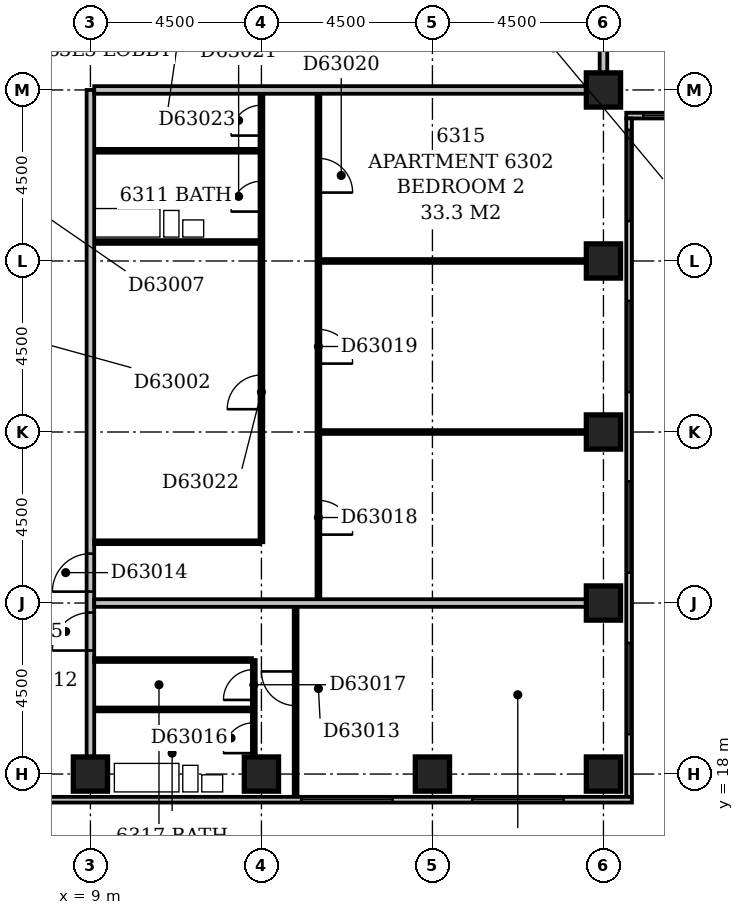
"""IFC4 building model, lengths in metres.
Left out: names, types, materials, properties, quantities, classifications, styles, units other than length and angle.
Written with IfcOpenShell. Run it as: python <this file> out.ifc"""

import sys

from ifc_helpers import new_model, si_unit, direction, frame, frame_2d, origin, origin_2d, place, context, subcontext, project, spatial, rectangle, extrude, element, fill, save


model = new_model("IFC4")
c1 = context("Model", 3, precision=1e-05, world=origin(), true_north=direction((0.0, 1.0)))
c2 = subcontext(c1, "Body", "Model", "MODEL_VIEW")
j1 = project(units=[si_unit("LENGTHUNIT", "METRE"), si_unit("PLANEANGLEUNIT", "RADIAN")], contexts=[c1])
p1 = place(None, origin())
s1 = spatial("IfcSite", under=j1, at=p1, CompositionType="ELEMENT")
p2 = place(p1, origin())
s2 = spatial("IfcBuilding", under=s1, at=p2, CompositionType="ELEMENT")
p3 = place(p2, frame((0.0, 0.0, 243.8)))
s3 = spatial("IfcBuildingStorey", under=s2, at=p3, CompositionType="ELEMENT", Elevation=243.8)
for number, where, z_axis, x_axis in (
    (1, (9.0, 18.0, -0.3), (0.0, 0.0, 1.0), (1.0, 0.0, 0.0)),
    (2, (13.5, 18.0, -0.3), (0.0, 0.0, 1.0), (1.0, 0.0, 0.0)),
    (3, (18.0, 18.0, -0.3), (0.0, 0.0, 1.0), (1.0, 0.0, 0.0)),
    (4, (22.5, 18.0, -0.3), (0.0, 0.0, 1.0), (1.0, 0.0, 0.0)),
    (5, (22.5, 22.5, -0.3), (0.0, 0.0, 1.0), (1.0, 0.0, 0.0)),
    (6, (22.5, 27.0, -0.3), (0.0, 0.0, 1.0), (1.0, 0.0, 0.0)),
    (7, (22.5, 31.5, -0.3), (0.0, 0.0, 1.0), (1.0, 0.0, 0.0)),
    (8, (22.5, 36.0, -0.3), (0.0, 0.0, 1.0), (1.0, 0.0, 0.0)),
):
    element("IfcColumn", number, at=place(p3, frame(where, z_axis=z_axis, x_axis=x_axis)), inside=s3, PredefinedType="COLUMN", context=c2, shape_type="SweptSolid", body=[
        extrude(rectangle(XDim=0.9, YDim=0.9, at=origin_2d()), origin(), (0.0, 0.0, 1.0), 3.6),
    ])
p4 = place(p3, frame((3.9, 17.325, 0.0), z_axis=(0.0, 0.0, 1.0), x_axis=(1.0, 0.0, 0.0)))
e9 = element("IfcWall", 9, at=p4, inside=s3, PredefinedType="STANDARD", context=c2, shape_type="SweptSolid", body=[
    extrude(rectangle(XDim=19.35, YDim=0.15, at=frame_2d((9.675, 0.0))), origin(), (0.0, 0.0, 1.0), 2.7),
])
p5 = place(p4, frame((10.65, 0.0, 0.6)))
e10 = element("IfcOpeningElement", 10, at=p5, cuts=e9, PredefinedType="OPENING", context=c2, shape_type="SweptSolid", body=[
    extrude(rectangle(XDim=2.4, YDim=1.8, at=frame_2d((1.2, 0.9))), frame((0.0, 0.087, 0.0), z_axis=(0.0, -1.0, 0.0), x_axis=(1.0, 0.0, 0.0)), (0.0, 0.0, 1.0), 0.174),
])
p6 = place(p4, frame((15.15, 0.0, 0.6)))
e11 = element("IfcOpeningElement", 11, at=p6, cuts=e9, PredefinedType="OPENING", context=c2, shape_type="SweptSolid", body=[
    extrude(rectangle(XDim=2.4, YDim=1.8, at=frame_2d((1.2, 0.9))), frame((0.0, 0.087, 0.0), z_axis=(0.0, -1.0, 0.0), x_axis=(1.0, 0.0, 0.0)), (0.0, 0.0, 1.0), 0.174),
])
p7 = place(p3, frame((23.175, 17.4, 0.0), z_axis=(0.0, 0.0, 1.0), x_axis=(0.0, 1.0, 0.0)))
e12 = element("IfcWall", 12, at=p7, inside=s3, PredefinedType="STANDARD", context=c2, shape_type="SweptSolid", body=[
    extrude(rectangle(XDim=17.85, YDim=0.15, at=frame_2d((8.925, 0.0))), origin(), (0.0, 0.0, 1.0), 2.7),
])
p8 = place(p7, frame((1.65, 0.0, 0.6)))
e13 = element("IfcOpeningElement", 13, at=p8, cuts=e12, PredefinedType="OPENING", context=c2, shape_type="SweptSolid", body=[
    extrude(rectangle(XDim=2.4, YDim=1.8, at=frame_2d((1.2, 0.9))), frame((0.0, 0.087, 0.0), z_axis=(0.0, -1.0, 0.0), x_axis=(1.0, 0.0, 0.0)), (0.0, 0.0, 1.0), 0.174),
])
p9 = place(p7, frame((5.901, 0.0, 0.6)))
e14 = element("IfcOpeningElement", 14, at=p9, cuts=e12, PredefinedType="OPENING", context=c2, shape_type="SweptSolid", body=[
    extrude(rectangle(XDim=2.4, YDim=1.8, at=frame_2d((1.2, 0.9))), frame((0.0, 0.087, 0.0), z_axis=(0.0, -1.0, 0.0), x_axis=(1.0, 0.0, 0.0)), (0.0, 0.0, 1.0), 0.174),
])
p10 = place(p7, frame((10.65, 0.0, 0.6)))
e15 = element("IfcOpeningElement", 15, at=p10, cuts=e12, PredefinedType="OPENING", context=c2, shape_type="SweptSolid", body=[
    extrude(rectangle(XDim=2.4, YDim=1.8, at=frame_2d((1.2, 0.9))), frame((0.0, 0.087, 0.0), z_axis=(0.0, -1.0, 0.0), x_axis=(1.0, 0.0, 0.0)), (0.0, 0.0, 1.0), 0.174),
])
p11 = place(p7, frame((15.15, 0.0, 0.6)))
e16 = element("IfcOpeningElement", 16, at=p11, cuts=e12, PredefinedType="OPENING", context=c2, shape_type="SweptSolid", body=[
    extrude(rectangle(XDim=2.4, YDim=1.8, at=frame_2d((1.2, 0.9))), frame((0.0, 0.087, 0.0), z_axis=(0.0, -1.0, 0.0), x_axis=(1.0, 0.0, 0.0)), (0.0, 0.0, 1.0), 0.174),
])
p12 = place(p3, frame((23.1, 35.325, 0.0), z_axis=(0.0, 0.0, 1.0), x_axis=(1.0, 0.0, 0.0)))
e17 = element("IfcWall", 17, at=p12, inside=s3, PredefinedType="STANDARD", context=c2, shape_type="SweptSolid", body=[
    extrude(rectangle(XDim=3.9, YDim=0.15, at=frame_2d((1.95, 0.0))), origin(), (0.0, 0.0, 1.0), 2.7),
])
p13 = place(p12, frame((0.45, 0.0, 0.6)))
e18 = element("IfcOpeningElement", 18, at=p13, cuts=e17, PredefinedType="OPENING", context=c2, shape_type="SweptSolid", body=[
    extrude(rectangle(XDim=2.4, YDim=1.8, at=frame_2d((1.2, 0.9))), frame((0.0, 0.087, 0.0), z_axis=(0.0, -1.0, 0.0), x_axis=(1.0, 0.0, 0.0)), (0.0, 0.0, 1.0), 0.174),
])
p14 = place(p3, frame((14.4, 17.4, 0.0), z_axis=(0.0, 0.0, 1.0), x_axis=(0.0, 1.0, 0.0)))
e19 = element("IfcWall", 19, at=p14, inside=s3, PredefinedType="PARTITIONING", context=c2, shape_type="SweptSolid", body=[
    extrude(rectangle(XDim=5.0, YDim=0.1, at=frame_2d((2.5, 0.0))), origin(), (0.0, 0.0, 1.0), 3.3),
])
p15 = place(p14, frame((2.4, 0.0, 0.0)))
e20 = element("IfcOpeningElement", 20, at=p15, cuts=e19, PredefinedType="OPENING", context=c2, shape_type="SweptSolid", body=[
    extrude(rectangle(XDim=0.9, YDim=2.1, at=frame_2d((0.45, 1.05))), frame((0.0, 0.062, 0.0), z_axis=(0.0, -1.0, 0.0), x_axis=(1.0, 0.0, 0.0)), (0.0, 0.0, 1.0), 0.124),
])
p16 = place(p3, frame((9.0, 18.45, 0.0), z_axis=(0.0, 0.0, 1.0), x_axis=(0.0, 1.0, 0.0)))
e21 = element("IfcWall", 21, at=p16, inside=s3, PredefinedType="PARTITIONING", context=c2, shape_type="SweptSolid", body=[
    extrude(rectangle(XDim=17.55, YDim=0.2, at=frame_2d((8.775, 0.0))), origin(), (0.0, 0.0, 1.0), 3.3),
])
p17 = place(p16, frame((4.35, 0.0, 0.0)))
e22 = element("IfcOpeningElement", 22, at=p17, cuts=e21, PredefinedType="OPENING", context=c2, shape_type="SweptSolid", body=[
    extrude(rectangle(XDim=1.0, YDim=2.1, at=frame_2d((0.5, 1.05))), frame((0.0, 0.112, 0.0), z_axis=(0.0, -1.0, 0.0), x_axis=(1.0, 0.0, 0.0)), (0.0, 0.0, 1.0), 0.224),
])
p18 = place(p16, frame((2.8, 0.0, 0.0)))
e23 = element("IfcOpeningElement", 23, at=p18, cuts=e21, PredefinedType="OPENING", context=c2, shape_type="SweptSolid", body=[
    extrude(rectangle(XDim=1.0, YDim=2.1, at=frame_2d((0.5, 1.05))), frame((0.0, 0.112, 0.0), z_axis=(0.0, -1.0, 0.0), x_axis=(1.0, 0.0, 0.0)), (0.0, 0.0, 1.0), 0.224),
])
p19 = place(p3, frame((13.3, 18.45, 0.0), z_axis=(0.0, 0.0, 1.0), x_axis=(0.0, 1.0, 0.0)))
e24 = element("IfcWall", 24, at=p19, inside=s3, PredefinedType="PARTITIONING", context=c2, shape_type="SweptSolid", body=[
    extrude(rectangle(XDim=2.55, YDim=0.1, at=frame_2d((1.275, 0.0))), origin(), (0.0, 0.0, 1.0), 3.3),
])
p20 = place(p19, frame((0.1, 0.0, 0.0)))
e25 = element("IfcOpeningElement", 25, at=p20, cuts=e24, PredefinedType="OPENING", context=c2, shape_type="SweptSolid", body=[
    extrude(rectangle(XDim=0.8, YDim=2.1, at=frame_2d((0.4, 1.05))), frame((0.0, 0.062, 0.0), z_axis=(0.0, -1.0, 0.0), x_axis=(1.0, 0.0, 0.0)), (0.0, 0.0, 1.0), 0.124),
])
p21 = place(p19, frame((1.5, 0.0, 0.0)))
e26 = element("IfcOpeningElement", 26, at=p21, cuts=e24, PredefinedType="OPENING", context=c2, shape_type="SweptSolid", body=[
    extrude(rectangle(XDim=0.8, YDim=2.1, at=frame_2d((0.4, 1.05))), frame((0.0, 0.062, 0.0), z_axis=(0.0, -1.0, 0.0), x_axis=(1.0, 0.0, 0.0)), (0.0, 0.0, 1.0), 0.124),
])
p22 = place(p3, frame((9.1, 19.7, 0.0), z_axis=(0.0, 0.0, 1.0), x_axis=(1.0, 0.0, 0.0)))
e27 = element("IfcWall", 27, at=p22, inside=s3, PredefinedType="PLUMBINGWALL", context=c2, shape_type="SweptSolid", body=[
    extrude(rectangle(XDim=4.15, YDim=0.1, at=frame_2d((2.075, 0.0))), origin(), (0.0, 0.0, 1.0), 3.3),
])
p23 = place(p3, frame((9.1, 21.0, 0.0), z_axis=(0.0, 0.0, 1.0), x_axis=(1.0, 0.0, 0.0)))
e28 = element("IfcWall", 28, at=p23, inside=s3, PredefinedType="PARTITIONING", context=c2, shape_type="SweptSolid", body=[
    extrude(rectangle(XDim=4.15, YDim=0.1, at=frame_2d((2.075, 0.0))), origin(), (0.0, 0.0, 1.0), 3.3),
])
p24 = place(p3, frame((9.1, 22.5, 0.0), z_axis=(0.0, 0.0, 1.0), x_axis=(1.0, 0.0, 0.0)))
e29 = element("IfcWall", 29, at=p24, inside=s3, PredefinedType="PARTITIONING", context=c2, shape_type="SweptSolid", body=[
    extrude(rectangle(XDim=12.95, YDim=0.2, at=frame_2d((6.475, 0.0))), origin(), (0.0, 0.0, 1.0), 3.3),
])
p25 = place(p3, frame((15.0, 22.6, 0.0), z_axis=(0.0, 0.0, 1.0), x_axis=(0.0, 1.0, 0.0)))
e30 = element("IfcWall", 30, at=p25, inside=s3, PredefinedType="PARTITIONING", context=c2, shape_type="SweptSolid", body=[
    extrude(rectangle(XDim=13.3, YDim=0.1, at=frame_2d((6.65, 0.0))), origin(), (0.0, 0.0, 1.0), 3.3),
])
p26 = place(p25, frame((1.7, 0.0, 0.0)))
e31 = element("IfcOpeningElement", 31, at=p26, cuts=e30, PredefinedType="OPENING", context=c2, shape_type="SweptSolid", body=[
    extrude(rectangle(XDim=0.9, YDim=2.1, at=frame_2d((0.45, 1.05))), frame((0.0, 0.062, 0.0), z_axis=(0.0, -1.0, 0.0), x_axis=(1.0, 0.0, 0.0)), (0.0, 0.0, 1.0), 0.124),
])
p27 = place(p25, frame((6.2, 0.0, 0.0)))
e32 = element("IfcOpeningElement", 32, at=p27, cuts=e30, PredefinedType="OPENING", context=c2, shape_type="SweptSolid", body=[
    extrude(rectangle(XDim=0.9, YDim=2.1, at=frame_2d((0.45, 1.05))), frame((0.0, 0.062, 0.0), z_axis=(0.0, -1.0, 0.0), x_axis=(1.0, 0.0, 0.0)), (0.0, 0.0, 1.0), 0.124),
])
p28 = place(p25, frame((10.7, 0.0, 0.0)))
e33 = element("IfcOpeningElement", 33, at=p28, cuts=e30, PredefinedType="OPENING", context=c2, shape_type="SweptSolid", body=[
    extrude(rectangle(XDim=0.9, YDim=2.1, at=frame_2d((0.45, 1.05))), frame((0.0, 0.062, 0.0), z_axis=(0.0, -1.0, 0.0), x_axis=(1.0, 0.0, 0.0)), (0.0, 0.0, 1.0), 0.124),
])
p29 = place(p3, frame((9.1, 24.1, 0.0), z_axis=(0.0, 0.0, 1.0), x_axis=(1.0, 0.0, 0.0)))
e34 = element("IfcWall", 34, at=p29, inside=s3, PredefinedType="PARTITIONING", context=c2, shape_type="SweptSolid", body=[
    extrude(rectangle(XDim=4.35, YDim=0.1, at=frame_2d((2.175, 0.0))), origin(), (0.0, 0.0, 1.0), 3.3),
])
p30 = place(p3, frame((13.5, 24.1, 0.0), z_axis=(0.0, 0.0, 1.0), x_axis=(0.0, 1.0, 0.0)))
e35 = element("IfcWall", 35, at=p30, inside=s3, PredefinedType="PARTITIONING", context=c2, shape_type="SweptSolid", body=[
    extrude(rectangle(XDim=11.8, YDim=0.1, at=frame_2d((5.9, 0.0))), origin(), (0.0, 0.0, 1.0), 3.3),
])
p31 = place(p30, frame((8.7, 0.0, 0.0)))
e36 = element("IfcOpeningElement", 36, at=p31, cuts=e35, PredefinedType="OPENING", context=c2, shape_type="SweptSolid", body=[
    extrude(rectangle(XDim=0.8, YDim=2.1, at=frame_2d((0.4, 1.05))), frame((0.0, 0.062, 0.0), z_axis=(0.0, -1.0, 0.0), x_axis=(1.0, 0.0, 0.0)), (0.0, 0.0, 1.0), 0.124),
])
p32 = place(p30, frame((3.5, 0.0, 0.0)))
e37 = element("IfcOpeningElement", 37, at=p32, cuts=e35, PredefinedType="OPENING", context=c2, shape_type="SweptSolid", body=[
    extrude(rectangle(XDim=0.9, YDim=2.1, at=frame_2d((0.45, 1.05))), frame((0.0, 0.062, 0.0), z_axis=(0.0, -1.0, 0.0), x_axis=(1.0, 0.0, 0.0)), (0.0, 0.0, 1.0), 0.124),
])
p33 = place(p30, frame((10.7, 0.0, 0.0)))
e38 = element("IfcOpeningElement", 38, at=p33, cuts=e35, PredefinedType="OPENING", context=c2, shape_type="SweptSolid", body=[
    extrude(rectangle(XDim=0.8, YDim=2.1, at=frame_2d((0.4, 1.05))), frame((0.0, 0.062, 0.0), z_axis=(0.0, -1.0, 0.0), x_axis=(1.0, 0.0, 0.0)), (0.0, 0.0, 1.0), 0.124),
])
p34 = place(p3, frame((15.05, 27.0, 0.0), z_axis=(0.0, 0.0, 1.0), x_axis=(1.0, 0.0, 0.0)))
e39 = element("IfcWall", 39, at=p34, inside=s3, PredefinedType="PARTITIONING", context=c2, shape_type="SweptSolid", body=[
    extrude(rectangle(XDim=7.0, YDim=0.1, at=frame_2d((3.5, 0.0))), origin(), (0.0, 0.0, 1.0), 2.7),
])
p35 = place(p3, frame((15.05, 31.5, 0.0), z_axis=(0.0, 0.0, 1.0), x_axis=(1.0, 0.0, 0.0)))
e40 = element("IfcWall", 40, at=p35, inside=s3, PredefinedType="PARTITIONING", context=c2, shape_type="SweptSolid", body=[
    extrude(rectangle(XDim=7.0, YDim=0.1, at=frame_2d((3.5, 0.0))), origin(), (0.0, 0.0, 1.0), 3.3),
])
for number, where, z_axis, x_axis in (
    (41, (9.1, 32.0, 0.0), (0.0, 0.0, 1.0), (1.0, 0.0, 0.0)),
    (42, (9.1, 34.4, 0.0), (0.0, 0.0, 1.0), (1.0, 0.0, 0.0)),
):
    element("IfcWall", number, at=place(p3, frame(where, z_axis=z_axis, x_axis=x_axis)), inside=s3, PredefinedType="PLUMBINGWALL", context=c2, shape_type="SweptSolid", body=[
        extrude(rectangle(XDim=4.35, YDim=0.1, at=frame_2d((2.175, 0.0))), origin(), (0.0, 0.0, 1.0), 3.3),
    ])
p36 = place(p3, frame((9.1, 36.0, 0.0), z_axis=(0.0, 0.0, 1.0), x_axis=(1.0, 0.0, 0.0)))
e43 = element("IfcWall", 43, at=p36, inside=s3, PredefinedType="PARTITIONING", context=c2, shape_type="SweptSolid", body=[
    extrude(rectangle(XDim=12.95, YDim=0.2, at=frame_2d((6.475, 0.0))), origin(), (0.0, 0.0, 1.0), 3.3),
])
p37 = place(p3, frame((22.5, 36.45, 0.0), z_axis=(0.0, 0.0, 1.0), x_axis=(0.0, 1.0, 0.0)))
e44 = element("IfcWall", 44, at=p37, inside=s3, PredefinedType="PARTITIONING", context=c2, shape_type="SweptSolid", body=[
    extrude(rectangle(XDim=13.05, YDim=0.2, at=frame_2d((6.525, 0.0))), origin(), (0.0, 0.0, 1.0), 3.3),
])
p38 = place(p5, origin())
e45 = element("IfcWindow", 45, at=p38, inside=s3, PartitioningType="SINGLE_PANEL", PredefinedType="WINDOW", context=c2, shape_type="SweptSolid", body=[
    extrude(rectangle(XDim=2.4, YDim=1.8, at=frame_2d((1.2, 0.9))), frame((0.0, 0.03, 0.0), z_axis=(0.0, -1.0, 0.0), x_axis=(1.0, 0.0, 0.0)), (0.0, 0.0, 1.0), 0.06),
])
fill(e10, e45)
p39 = place(p6, origin())
e46 = element("IfcWindow", 46, at=p39, inside=s3, PartitioningType="SINGLE_PANEL", PredefinedType="WINDOW", context=c2, shape_type="SweptSolid", body=[
    extrude(rectangle(XDim=2.4, YDim=1.8, at=frame_2d((1.2, 0.9))), frame((0.0, 0.03, 0.0), z_axis=(0.0, -1.0, 0.0), x_axis=(1.0, 0.0, 0.0)), (0.0, 0.0, 1.0), 0.06),
])
fill(e11, e46)
p40 = place(p8, origin())
e47 = element("IfcWindow", 47, at=p40, inside=s3, PartitioningType="SINGLE_PANEL", PredefinedType="WINDOW", context=c2, shape_type="SweptSolid", body=[
    extrude(rectangle(XDim=2.4, YDim=1.8, at=frame_2d((1.2, 0.9))), frame((0.0, 0.03, 0.0), z_axis=(0.0, -1.0, 0.0), x_axis=(1.0, 0.0, 0.0)), (0.0, 0.0, 1.0), 0.06),
])
fill(e13, e47)
p41 = place(p9, origin())
e48 = element("IfcWindow", 48, at=p41, inside=s3, PartitioningType="SINGLE_PANEL", PredefinedType="WINDOW", context=c2, shape_type="SweptSolid", body=[
    extrude(rectangle(XDim=2.4, YDim=1.8, at=frame_2d((1.2, 0.9))), frame((0.0, 0.03, 0.0), z_axis=(0.0, -1.0, 0.0), x_axis=(1.0, 0.0, 0.0)), (0.0, 0.0, 1.0), 0.06),
])
fill(e14, e48)
p42 = place(p10, origin())
e49 = element("IfcWindow", 49, at=p42, inside=s3, PartitioningType="SINGLE_PANEL", PredefinedType="WINDOW", context=c2, shape_type="SweptSolid", body=[
    extrude(rectangle(XDim=2.4, YDim=1.8, at=frame_2d((1.2, 0.9))), frame((0.0, 0.03, 0.0), z_axis=(0.0, -1.0, 0.0), x_axis=(1.0, 0.0, 0.0)), (0.0, 0.0, 1.0), 0.06),
])
fill(e15, e49)
p43 = place(p11, origin())
e50 = element("IfcWindow", 50, at=p43, inside=s3, PartitioningType="SINGLE_PANEL", PredefinedType="WINDOW", context=c2, shape_type="SweptSolid", body=[
    extrude(rectangle(XDim=2.4, YDim=1.8, at=frame_2d((1.2, 0.9))), frame((0.0, 0.03, 0.0), z_axis=(0.0, -1.0, 0.0), x_axis=(1.0, 0.0, 0.0)), (0.0, 0.0, 1.0), 0.06),
])
fill(e16, e50)
p44 = place(p13, origin())
e51 = element("IfcWindow", 51, at=p44, inside=s3, PartitioningType="SINGLE_PANEL", PredefinedType="WINDOW", context=c2, shape_type="SweptSolid", body=[
    extrude(rectangle(XDim=2.4, YDim=1.8, at=frame_2d((1.2, 0.9))), frame((0.0, 0.03, 0.0), z_axis=(0.0, -1.0, 0.0), x_axis=(1.0, 0.0, 0.0)), (0.0, 0.0, 1.0), 0.06),
])
fill(e18, e51)
p45 = place(p15, frame((0.9, 0.0, 0.0), z_axis=(0.0, 0.0, 1.0), x_axis=(-1.0, 0.0, 0.0)))
e52 = element("IfcDoor", 52, at=p45, inside=s3, OperationType="SINGLE_SWING_LEFT", PredefinedType="DOOR", context=c2, shape_type="SweptSolid", body=[
    extrude(rectangle(XDim=0.9, YDim=2.1, at=frame_2d((0.45, 1.05))), frame((0.0, 0.025, 0.0), z_axis=(0.0, -1.0, 0.0), x_axis=(1.0, 0.0, 0.0)), (0.0, 0.0, 1.0), 0.05),
])
fill(e20, e52)
p46 = place(p17, origin())
e53 = element("IfcDoor", 53, at=p46, inside=s3, OperationType="SINGLE_SWING_LEFT", PredefinedType="DOOR", context=c2, shape_type="SweptSolid", body=[
    extrude(rectangle(XDim=1.0, YDim=2.1, at=frame_2d((0.5, 1.05))), frame((0.0, 0.025, 0.0), z_axis=(0.0, -1.0, 0.0), x_axis=(1.0, 0.0, 0.0)), (0.0, 0.0, 1.0), 0.05),
])
fill(e22, e53)
p47 = place(p18, origin())
e54 = element("IfcDoor", 54, at=p47, inside=s3, OperationType="SINGLE_SWING_LEFT", PredefinedType="DOOR", context=c2, shape_type="SweptSolid", body=[
    extrude(rectangle(XDim=1.0, YDim=2.1, at=frame_2d((0.5, 1.05))), frame((0.0, 0.025, 0.0), z_axis=(0.0, -1.0, 0.0), x_axis=(1.0, 0.0, 0.0)), (0.0, 0.0, 1.0), 0.05),
])
fill(e23, e54)
p48 = place(p20, origin())
e55 = element("IfcDoor", 55, at=p48, inside=s3, OperationType="SINGLE_SWING_LEFT", PredefinedType="DOOR", context=c2, shape_type="SweptSolid", body=[
    extrude(rectangle(XDim=0.8, YDim=2.1, at=frame_2d((0.4, 1.05))), frame((0.0, 0.025, 0.0), z_axis=(0.0, -1.0, 0.0), x_axis=(1.0, 0.0, 0.0)), (0.0, 0.0, 1.0), 0.05),
])
fill(e25, e55)
p49 = place(p21, origin())
e56 = element("IfcDoor", 56, at=p49, inside=s3, OperationType="SINGLE_SWING_LEFT", PredefinedType="DOOR", context=c2, shape_type="SweptSolid", body=[
    extrude(rectangle(XDim=0.8, YDim=2.1, at=frame_2d((0.4, 1.05))), frame((0.0, 0.025, 0.0), z_axis=(0.0, -1.0, 0.0), x_axis=(1.0, 0.0, 0.0)), (0.0, 0.0, 1.0), 0.05),
])
fill(e26, e56)
p50 = place(p26, frame((0.9, 0.0, 0.0), z_axis=(0.0, 0.0, 1.0), x_axis=(-1.0, 0.0, 0.0)))
e57 = element("IfcDoor", 57, at=p50, inside=s3, OperationType="SINGLE_SWING_RIGHT", PredefinedType="DOOR", context=c2, shape_type="SweptSolid", body=[
    extrude(rectangle(XDim=0.9, YDim=2.1, at=frame_2d((0.45, 1.05))), frame((0.0, 0.025, 0.0), z_axis=(0.0, -1.0, 0.0), x_axis=(1.0, 0.0, 0.0)), (0.0, 0.0, 1.0), 0.05),
])
fill(e31, e57)
p51 = place(p27, frame((0.9, 0.0, 0.0), z_axis=(0.0, 0.0, 1.0), x_axis=(-1.0, 0.0, 0.0)))
e58 = element("IfcDoor", 58, at=p51, inside=s3, OperationType="SINGLE_SWING_RIGHT", PredefinedType="DOOR", context=c2, shape_type="SweptSolid", body=[
    extrude(rectangle(XDim=0.9, YDim=2.1, at=frame_2d((0.45, 1.05))), frame((0.0, 0.025, 0.0), z_axis=(0.0, -1.0, 0.0), x_axis=(1.0, 0.0, 0.0)), (0.0, 0.0, 1.0), 0.05),
])
fill(e32, e58)
p52 = place(p28, frame((0.9, 0.0, 0.0), z_axis=(0.0, 0.0, 1.0), x_axis=(-1.0, 0.0, 0.0)))
e59 = element("IfcDoor", 59, at=p52, inside=s3, OperationType="SINGLE_SWING_RIGHT", PredefinedType="DOOR", context=c2, shape_type="SweptSolid", body=[
    extrude(rectangle(XDim=0.9, YDim=2.1, at=frame_2d((0.45, 1.05))), frame((0.0, 0.025, 0.0), z_axis=(0.0, -1.0, 0.0), x_axis=(1.0, 0.0, 0.0)), (0.0, 0.0, 1.0), 0.05),
])
fill(e33, e59)
p53 = place(p31, origin())
e60 = element("IfcDoor", 60, at=p53, inside=s3, OperationType="SINGLE_SWING_LEFT", PredefinedType="DOOR", context=c2, shape_type="SweptSolid", body=[
    extrude(rectangle(XDim=0.8, YDim=2.1, at=frame_2d((0.4, 1.05))), frame((0.0, 0.025, 0.0), z_axis=(0.0, -1.0, 0.0), x_axis=(1.0, 0.0, 0.0)), (0.0, 0.0, 1.0), 0.05),
])
fill(e36, e60)
p54 = place(p32, origin())
e61 = element("IfcDoor", 61, at=p54, inside=s3, OperationType="SINGLE_SWING_LEFT", PredefinedType="DOOR", context=c2, shape_type="SweptSolid", body=[
    extrude(rectangle(XDim=0.9, YDim=2.1, at=frame_2d((0.45, 1.05))), frame((0.0, 0.025, 0.0), z_axis=(0.0, -1.0, 0.0), x_axis=(1.0, 0.0, 0.0)), (0.0, 0.0, 1.0), 0.05),
])
fill(e37, e61)
p55 = place(p33, origin())
e62 = element("IfcDoor", 62, at=p55, inside=s3, OperationType="SINGLE_SWING_LEFT", PredefinedType="DOOR", context=c2, shape_type="SweptSolid", body=[
    extrude(rectangle(XDim=0.8, YDim=2.1, at=frame_2d((0.4, 1.05))), frame((0.0, 0.025, 0.0), z_axis=(0.0, -1.0, 0.0), x_axis=(1.0, 0.0, 0.0)), (0.0, 0.0, 1.0), 0.05),
])
fill(e38, e62)
save(model, sys.argv[1])
